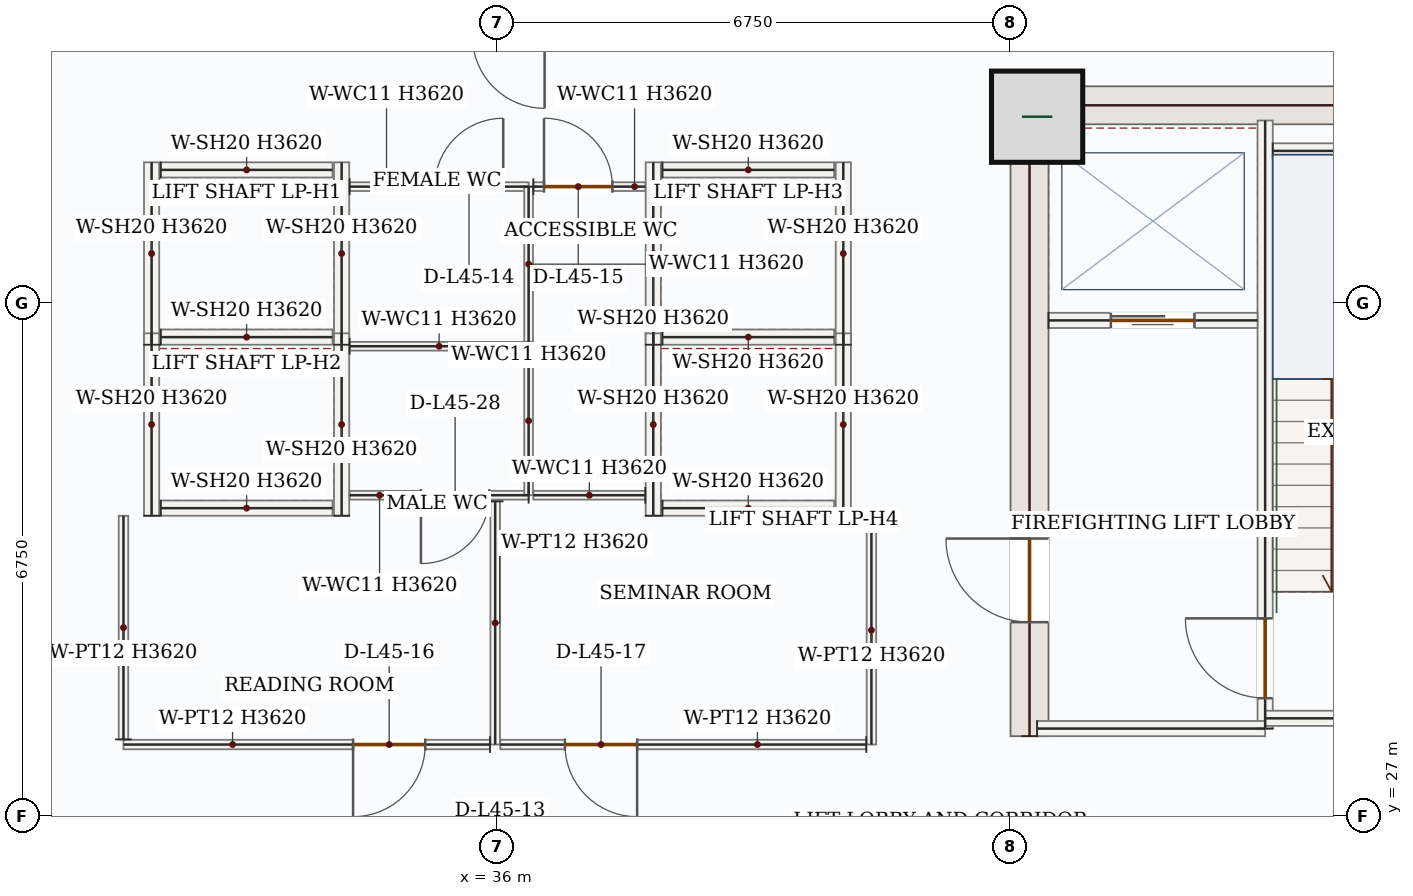
"""IFC4 building model, lengths in metres.
Left out: names, types, materials, properties, quantities, classifications, styles, units other than length and angle.
Written with IfcOpenShell. Run it as: python <this file> out.ifc"""

import sys

from ifc_helpers import new_model, si_unit, direction, frame, frame_2d, origin, origin_2d, place, context, subcontext, project, spatial, rectangle, extrude, source, transform, mapped, element, fill, save


model = new_model("IFC4")
c1 = context("Model", 3, precision=1e-05, world=origin(), true_north=direction((0.0, 1.0)))
c2 = subcontext(c1, "Body", "Model", "MODEL_VIEW")
j1 = project(units=[si_unit("LENGTHUNIT", "METRE"), si_unit("PLANEANGLEUNIT", "RADIAN")], contexts=[c1])
p1 = place(None, origin())
s1 = spatial("IfcSite", under=j1, at=p1, CompositionType="ELEMENT")
p2 = place(p1, origin())
s2 = spatial("IfcBuilding", under=s1, at=p2, CompositionType="ELEMENT")
p3 = place(p2, frame((0.0, 0.0, 194.1)))
s3 = spatial("IfcBuildingStorey", under=s2, at=p3, CompositionType="ELEMENT", Elevation=194.1)
p4 = place(p3, frame((43.0, 28.05, 0.0), z_axis=(0.0, 0.0, 1.0), x_axis=(0.0, 1.0, 0.0)))
e1 = element("IfcWall", 1, at=p4, inside=s3, PredefinedType="SHEAR", context=c2, shape_type="SweptSolid", body=[
    extrude(rectangle(XDim=8.55, YDim=0.5, at=frame_2d((4.275, 0.0))), origin(), (0.0, 0.0, 1.0), 3.62),
])
p5 = place(p4, frame((1.5, 0.0, 0.0)))
e2 = element("IfcOpeningElement", 2, at=p5, cuts=e1, PredefinedType="OPENING", context=c2, shape_type="SweptSolid", body=[
    extrude(rectangle(XDim=1.1, YDim=2.2, at=frame_2d((0.55, 1.1))), frame((0.0, 0.26, 0.0), z_axis=(0.0, -1.0, 0.0), x_axis=(1.0, 0.0, 0.0)), (0.0, 0.0, 1.0), 0.52),
])
m1 = source(origin(), c2, "Body", "SweptSolid", [
    extrude(rectangle(XDim=7.0, YDim=0.5, at=frame_2d((3.5, 0.0))), origin(), (0.0, 0.0, 1.0), 3.62),
])
p6 = place(p3, frame((43.25, 36.35, 0.0), z_axis=(0.0, 0.0, 1.0), x_axis=(1.0, 0.0, 0.0)))
e3 = element("IfcWall", 3, at=p6, inside=s3, PredefinedType="SHEAR", context=c2, shape_type="MappedRepresentation", body=[
    mapped(m1, transform((0.0, 0.0, 0.0), x_axis=(1.0, 0.0, 0.0), y_axis=(0.0, 1.0, 0.0), z_axis=(0.0, 0.0, 1.0), scale=1.0)),
])
m2 = source(origin(), c2, "Body", "SweptSolid", [
    extrude(rectangle(XDim=1.2, YDim=1.2, at=origin_2d()), origin(), (0.0, 0.0, 1.0), 3.9),
])
p7 = place(p3, frame((43.1, 36.2, 0.0), z_axis=(0.0, 0.0, 1.0), x_axis=(1.0, 0.0, 0.0)))
e4 = element("IfcColumn", 4, at=p7, inside=s3, PredefinedType="COLUMN", context=c2, shape_type="MappedRepresentation", body=[
    mapped(m2, transform((0.0, 0.0, 0.0), x_axis=(1.0, 0.0, 0.0), y_axis=(0.0, 1.0, 0.0), z_axis=(0.0, 0.0, 1.0), scale=1.0)),
])
p8 = place(p3, frame((46.1, 28.15, 0.0), z_axis=(0.0, 0.0, 1.0), x_axis=(0.0, 1.0, 0.0)))
e5 = element("IfcWall", 5, at=p8, inside=s3, PredefinedType="SOLIDWALL", context=c2, shape_type="SweptSolid", body=[
    extrude(rectangle(XDim=8.0, YDim=0.2, at=frame_2d((4.0, 0.0))), origin(), (0.0, 0.0, 1.0), 3.62),
])
p9 = place(p8, frame((0.4, 0.0, 0.0)))
e6 = element("IfcOpeningElement", 6, at=p9, cuts=e5, PredefinedType="OPENING", context=c2, shape_type="SweptSolid", body=[
    extrude(rectangle(XDim=1.05, YDim=2.15, at=frame_2d((0.525, 1.075))), frame((0.0, 0.11, 0.0), z_axis=(0.0, -1.0, 0.0), x_axis=(1.0, 0.0, 0.0)), (0.0, 0.0, 1.0), 0.22),
])
m3 = source(origin(), c2, "Body", "SweptSolid", [
    extrude(rectangle(XDim=3.0, YDim=0.2, at=frame_2d((1.5, 0.0))), origin(), (0.0, 0.0, 1.0), 3.62),
])
p10 = place(p3, frame((43.1, 28.15, 0.0), z_axis=(0.0, 0.0, 1.0), x_axis=(1.0, 0.0, 0.0)))
e7 = element("IfcWall", 7, at=p10, inside=s3, PredefinedType="SOLIDWALL", context=c2, shape_type="MappedRepresentation", body=[
    mapped(m3, transform((0.0, 0.0, 0.0), x_axis=(1.0, 0.0, 0.0), y_axis=(0.0, 1.0, 0.0), z_axis=(0.0, 0.0, 1.0), scale=1.0)),
])
m4 = source(origin(), c2, "Body", "SweptSolid", [
    extrude(rectangle(XDim=4.25, YDim=0.2, at=frame_2d((2.125, 0.0))), origin(), (0.0, 0.0, 1.0), 3.62),
])
p11 = place(p3, frame((46.1, 28.285, 0.0), z_axis=(0.0, 0.0, 1.0), x_axis=(1.0, 0.0, 0.0)))
e8 = element("IfcWall", 8, at=p11, inside=s3, PredefinedType="SOLIDWALL", context=c2, shape_type="MappedRepresentation", body=[
    mapped(m4, transform((0.0, 0.0, 0.0), x_axis=(1.0, 0.0, 0.0), y_axis=(0.0, 1.0, 0.0), z_axis=(0.0, 0.0, 1.0), scale=1.0)),
])
m5 = source(origin(), c2, "Body", "SweptSolid", [
    extrude(rectangle(XDim=3.25, YDim=0.2, at=frame_2d((1.625, 0.0))), origin(), (0.0, 0.0, 1.0), 3.62),
])
p12 = place(p3, frame((46.2, 35.75, 0.0), z_axis=(0.0, 0.0, 1.0), x_axis=(1.0, 0.0, 0.0)))
e9 = element("IfcWall", 9, at=p12, inside=s3, PredefinedType="SOLIDWALL", context=c2, shape_type="MappedRepresentation", body=[
    mapped(m5, transform((0.0, 0.0, 0.0), x_axis=(1.0, 0.0, 0.0), y_axis=(0.0, 1.0, 0.0), z_axis=(0.0, 0.0, 1.0), scale=1.0)),
])
p13 = place(p3, frame((43.25, 33.52, 0.0), z_axis=(0.0, 0.0, 1.0), x_axis=(1.0, 0.0, 0.0)))
e10 = element("IfcWall", 10, at=p13, inside=s3, PredefinedType="SOLIDWALL", context=c2, shape_type="SweptSolid", body=[
    extrude(rectangle(XDim=2.75, YDim=0.2, at=frame_2d((1.375, 0.0))), origin(), (0.0, 0.0, 1.0), 3.62),
])
p14 = place(p13, frame((0.82, 0.0, 0.0)))
e11 = element("IfcOpeningElement", 11, at=p14, cuts=e10, PredefinedType="OPENING", context=c2, shape_type="SweptSolid", body=[
    extrude(rectangle(XDim=1.1, YDim=2.15, at=frame_2d((0.55, 1.075))), frame((0.0, 0.11, 0.0), z_axis=(0.0, -1.0, 0.0), x_axis=(1.0, 0.0, 0.0)), (0.0, 0.0, 1.0), 0.22),
])
m6 = source(origin(), c2, "Body", "SweptSolid", [
    extrude(rectangle(XDim=2.4, YDim=0.2, at=frame_2d((1.2, 0.0))), origin(), (0.0, 0.0, 1.0), 3.62),
])
for number, where, z_axis, x_axis in (
    (12, (31.45, 33.2, 0.0), (0.0, 0.0, 1.0), (0.0, 1.0, 0.0)),
    (13, (33.95, 33.2, 0.0), (0.0, 0.0, 1.0), (0.0, 1.0, 0.0)),
):
    element("IfcWall", number, at=place(p3, frame(where, z_axis=z_axis, x_axis=x_axis)), inside=s3, PredefinedType="SOLIDWALL", context=c2, shape_type="MappedRepresentation", body=[
        mapped(m6, transform((0.0, 0.0, 0.0), x_axis=(1.0, 0.0, 0.0), y_axis=(0.0, 1.0, 0.0), z_axis=(0.0, 0.0, 1.0), scale=1.0)),
    ])
m7 = source(origin(), c2, "Body", "SweptSolid", [
    extrude(rectangle(XDim=2.26, YDim=0.2, at=frame_2d((1.13, 0.0))), origin(), (0.0, 0.0, 1.0), 3.62),
])
for number, where, z_axis, x_axis in (
    (14, (31.57, 33.3, 0.0), (0.0, 0.0, 1.0), (1.0, 0.0, 0.0)),
    (15, (31.57, 35.5, 0.0), (0.0, 0.0, 1.0), (1.0, 0.0, 0.0)),
):
    element("IfcWall", number, at=place(p3, frame(where, z_axis=z_axis, x_axis=x_axis)), inside=s3, PredefinedType="SOLIDWALL", context=c2, shape_type="MappedRepresentation", body=[
        mapped(m7, transform((0.0, 0.0, 0.0), x_axis=(1.0, 0.0, 0.0), y_axis=(0.0, 1.0, 0.0), z_axis=(0.0, 0.0, 1.0), scale=1.0)),
    ])
for number, where, z_axis, x_axis in (
    (16, (31.45, 30.95, 0.0), (0.0, 0.0, 1.0), (0.0, 1.0, 0.0)),
    (17, (33.95, 30.95, 0.0), (0.0, 0.0, 1.0), (0.0, 1.0, 0.0)),
):
    element("IfcWall", number, at=place(p3, frame(where, z_axis=z_axis, x_axis=x_axis)), inside=s3, PredefinedType="SOLIDWALL", context=c2, shape_type="MappedRepresentation", body=[
        mapped(m6, transform((0.0, 0.0, 0.0), x_axis=(1.0, 0.0, 0.0), y_axis=(0.0, 1.0, 0.0), z_axis=(0.0, 0.0, 1.0), scale=1.0)),
    ])
p15 = place(p3, frame((31.57, 31.05, 0.0), z_axis=(0.0, 0.0, 1.0), x_axis=(1.0, 0.0, 0.0)))
e18 = element("IfcWall", 18, at=p15, inside=s3, PredefinedType="SOLIDWALL", context=c2, shape_type="MappedRepresentation", body=[
    mapped(m7, transform((0.0, 0.0, 0.0), x_axis=(1.0, 0.0, 0.0), y_axis=(0.0, 1.0, 0.0), z_axis=(0.0, 0.0, 1.0), scale=1.0)),
])
for number, where, z_axis, x_axis in (
    (19, (38.05, 33.2, 0.0), (0.0, 0.0, 1.0), (0.0, 1.0, 0.0)),
    (20, (40.55, 33.2, 0.0), (0.0, 0.0, 1.0), (0.0, 1.0, 0.0)),
):
    element("IfcWall", number, at=place(p3, frame(where, z_axis=z_axis, x_axis=x_axis)), inside=s3, PredefinedType="SOLIDWALL", context=c2, shape_type="MappedRepresentation", body=[
        mapped(m6, transform((0.0, 0.0, 0.0), x_axis=(1.0, 0.0, 0.0), y_axis=(0.0, 1.0, 0.0), z_axis=(0.0, 0.0, 1.0), scale=1.0)),
    ])
for number, where, z_axis, x_axis in (
    (21, (38.17, 33.3, 0.0), (0.0, 0.0, 1.0), (1.0, 0.0, 0.0)),
    (22, (38.17, 35.5, 0.0), (0.0, 0.0, 1.0), (1.0, 0.0, 0.0)),
):
    element("IfcWall", number, at=place(p3, frame(where, z_axis=z_axis, x_axis=x_axis)), inside=s3, PredefinedType="SOLIDWALL", context=c2, shape_type="MappedRepresentation", body=[
        mapped(m7, transform((0.0, 0.0, 0.0), x_axis=(1.0, 0.0, 0.0), y_axis=(0.0, 1.0, 0.0), z_axis=(0.0, 0.0, 1.0), scale=1.0)),
    ])
for number, where, z_axis, x_axis in (
    (23, (38.05, 30.95, 0.0), (0.0, 0.0, 1.0), (0.0, 1.0, 0.0)),
    (24, (40.55, 30.95, 0.0), (0.0, 0.0, 1.0), (0.0, 1.0, 0.0)),
):
    element("IfcWall", number, at=place(p3, frame(where, z_axis=z_axis, x_axis=x_axis)), inside=s3, PredefinedType="SOLIDWALL", context=c2, shape_type="MappedRepresentation", body=[
        mapped(m6, transform((0.0, 0.0, 0.0), x_axis=(1.0, 0.0, 0.0), y_axis=(0.0, 1.0, 0.0), z_axis=(0.0, 0.0, 1.0), scale=1.0)),
    ])
p16 = place(p3, frame((38.17, 31.05, 0.0), z_axis=(0.0, 0.0, 1.0), x_axis=(1.0, 0.0, 0.0)))
e25 = element("IfcWall", 25, at=p16, inside=s3, PredefinedType="SOLIDWALL", context=c2, shape_type="MappedRepresentation", body=[
    mapped(m7, transform((0.0, 0.0, 0.0), x_axis=(1.0, 0.0, 0.0), y_axis=(0.0, 1.0, 0.0), z_axis=(0.0, 0.0, 1.0), scale=1.0)),
])
p17 = place(p3, frame((36.41, 31.22, 0.0), z_axis=(0.0, 0.0, 1.0), x_axis=(-1.0, 0.0, 0.0)))
e26 = element("IfcWall", 26, at=p17, inside=s3, PredefinedType="PARTITIONING", context=c2, shape_type="SweptSolid", body=[
    extrude(rectangle(XDim=2.355, YDim=0.115, at=frame_2d((1.177, 0.0))), origin(), (0.0, 0.0, 1.0), 3.62),
])
p18 = place(p17, frame((0.517, 0.0, 0.0)))
e27 = element("IfcOpeningElement", 27, at=p18, cuts=e26, PredefinedType="OPENING", context=c2, shape_type="SweptSolid", body=[
    extrude(rectangle(XDim=0.9, YDim=2.1, at=frame_2d((0.45, 1.05))), frame((0.0, 0.067, 0.0), z_axis=(0.0, -1.0, 0.0), x_axis=(1.0, 0.0, 0.0)), (0.0, 0.0, 1.0), 0.135),
])
m8 = source(origin(), c2, "Body", "SweptSolid", [
    extrude(rectangle(XDim=2.355, YDim=0.115, at=frame_2d((1.177, 0.0))), origin(), (0.0, 0.0, 1.0), 3.62),
])
p19 = place(p3, frame((34.055, 33.18, 0.0), z_axis=(0.0, 0.0, 1.0), x_axis=(1.0, 0.0, 0.0)))
e28 = element("IfcWall", 28, at=p19, inside=s3, PredefinedType="PARTITIONING", context=c2, shape_type="MappedRepresentation", body=[
    mapped(m8, transform((0.0, 0.0, 0.0), x_axis=(1.0, 0.0, 0.0), y_axis=(0.0, 1.0, 0.0), z_axis=(0.0, 0.0, 1.0), scale=1.0)),
])
m9 = source(origin(), c2, "Body", "SweptSolid", [
    extrude(rectangle(XDim=1.96, YDim=0.115, at=frame_2d((0.98, 0.0))), origin(), (0.0, 0.0, 1.0), 3.62),
])
p20 = place(p3, frame((36.41, 33.18, 0.0), z_axis=(0.0, 0.0, 1.0), x_axis=(0.0, -1.0, 0.0)))
e29 = element("IfcWall", 29, at=p20, inside=s3, PredefinedType="PARTITIONING", context=c2, shape_type="MappedRepresentation", body=[
    mapped(m9, transform((0.0, 0.0, 0.0), x_axis=(1.0, 0.0, 0.0), y_axis=(0.0, 1.0, 0.0), z_axis=(0.0, 0.0, 1.0), scale=1.0)),
])
p21 = place(p3, frame((34.055, 35.28, 0.0), z_axis=(0.0, 0.0, 1.0), x_axis=(1.0, 0.0, 0.0)))
e30 = element("IfcWall", 30, at=p21, inside=s3, PredefinedType="PARTITIONING", context=c2, shape_type="SweptSolid", body=[
    extrude(rectangle(XDim=2.355, YDim=0.115, at=frame_2d((1.177, 0.0))), origin(), (0.0, 0.0, 1.0), 3.62),
])
p22 = place(p21, frame((1.121, 0.0, 0.0)))
e31 = element("IfcOpeningElement", 31, at=p22, cuts=e30, PredefinedType="OPENING", context=c2, shape_type="SweptSolid", body=[
    extrude(rectangle(XDim=0.9, YDim=2.1, at=frame_2d((0.45, 1.05))), frame((0.0, 0.067, 0.0), z_axis=(0.0, -1.0, 0.0), x_axis=(1.0, 0.0, 0.0)), (0.0, 0.0, 1.0), 0.135),
])
m10 = source(origin(), c2, "Body", "SweptSolid", [
    extrude(rectangle(XDim=2.04, YDim=0.115, at=frame_2d((1.02, 0.0))), origin(), (0.0, 0.0, 1.0), 3.62),
])
p23 = place(p3, frame((36.41, 35.28, 0.0), z_axis=(0.0, 0.0, 1.0), x_axis=(0.0, -1.0, 0.0)))
e32 = element("IfcWall", 32, at=p23, inside=s3, PredefinedType="PARTITIONING", context=c2, shape_type="MappedRepresentation", body=[
    mapped(m10, transform((0.0, 0.0, 0.0), x_axis=(1.0, 0.0, 0.0), y_axis=(0.0, 1.0, 0.0), z_axis=(0.0, 0.0, 1.0), scale=1.0)),
])
m11 = source(origin(), c2, "Body", "SweptSolid", [
    extrude(rectangle(XDim=1.473, YDim=0.115, at=frame_2d((0.736, 0.0))), origin(), (0.0, 0.0, 1.0), 3.62),
])
p24 = place(p3, frame((37.945, 31.22, 0.0), z_axis=(0.0, 0.0, 1.0), x_axis=(-1.0, 0.0, 0.0)))
e33 = element("IfcWall", 33, at=p24, inside=s3, PredefinedType="PARTITIONING", context=c2, shape_type="MappedRepresentation", body=[
    mapped(m11, transform((0.0, 0.0, 0.0), x_axis=(1.0, 0.0, 0.0), y_axis=(0.0, 1.0, 0.0), z_axis=(0.0, 0.0, 1.0), scale=1.0)),
])
p25 = place(p3, frame((36.472, 35.28, 0.0), z_axis=(0.0, 0.0, 1.0), x_axis=(1.0, 0.0, 0.0)))
e34 = element("IfcWall", 34, at=p25, inside=s3, PredefinedType="PARTITIONING", context=c2, shape_type="SweptSolid", body=[
    extrude(rectangle(XDim=1.473, YDim=0.115, at=frame_2d((0.736, 0.0))), origin(), (0.0, 0.0, 1.0), 3.62),
])
p26 = place(p25, frame((0.14, 0.0, 0.0)))
e35 = element("IfcOpeningElement", 35, at=p26, cuts=e34, PredefinedType="OPENING", context=c2, shape_type="SweptSolid", body=[
    extrude(rectangle(XDim=0.9, YDim=2.1, at=frame_2d((0.45, 1.05))), frame((0.0, 0.067, 0.0), z_axis=(0.0, -1.0, 0.0), x_axis=(1.0, 0.0, 0.0)), (0.0, 0.0, 1.0), 0.135),
])
m12 = source(origin(), c2, "Body", "SweptSolid", [
    extrude(rectangle(XDim=3.2, YDim=0.125, at=frame_2d((1.6, 0.0))), origin(), (0.0, 0.0, 1.0), 3.62),
])
p27 = place(p3, frame((35.97, 31.14, 0.0), z_axis=(0.0, 0.0, 1.0), x_axis=(0.0, -1.0, 0.0)))
e36 = element("IfcWall", 36, at=p27, inside=s3, PredefinedType="PARTITIONING", context=c2, shape_type="MappedRepresentation", body=[
    mapped(m12, transform((0.0, 0.0, 0.0), x_axis=(1.0, 0.0, 0.0), y_axis=(0.0, 1.0, 0.0), z_axis=(0.0, 0.0, 1.0), scale=1.0)),
])
p28 = place(p3, frame((35.903, 27.94, 0.0), z_axis=(0.0, 0.0, 1.0), x_axis=(-1.0, 0.0, 0.0)))
e37 = element("IfcWall", 37, at=p28, inside=s3, PredefinedType="PARTITIONING", context=c2, shape_type="SweptSolid", body=[
    extrude(rectangle(XDim=4.823, YDim=0.125, at=frame_2d((2.411, 0.0))), origin(), (0.0, 0.0, 1.0), 3.62),
])
p29 = place(p28, frame((0.852, 0.0, 0.0)))
e38 = element("IfcOpeningElement", 38, at=p29, cuts=e37, PredefinedType="OPENING", context=c2, shape_type="SweptSolid", body=[
    extrude(rectangle(XDim=0.95, YDim=2.15, at=frame_2d((0.475, 1.075))), frame((0.0, 0.073, 0.0), z_axis=(0.0, -1.0, 0.0), x_axis=(1.0, 0.0, 0.0)), (0.0, 0.0, 1.0), 0.145),
])
m13 = source(origin(), c2, "Body", "SweptSolid", [
    extrude(rectangle(XDim=2.942, YDim=0.125, at=frame_2d((1.471, 0.0))), origin(), (0.0, 0.0, 1.0), 3.62),
])
p30 = place(p3, frame((31.08, 28.008, 0.0), z_axis=(0.0, 0.0, 1.0), x_axis=(0.0, 1.0, 0.0)))
e39 = element("IfcWall", 39, at=p30, inside=s3, PredefinedType="PARTITIONING", context=c2, shape_type="MappedRepresentation", body=[
    mapped(m13, transform((0.0, 0.0, 0.0), x_axis=(1.0, 0.0, 0.0), y_axis=(0.0, 1.0, 0.0), z_axis=(0.0, 0.0, 1.0), scale=1.0)),
])
m14 = source(origin(), c2, "Body", "SweptSolid", [
    extrude(rectangle(XDim=3.01, YDim=0.125, at=frame_2d((1.505, 0.0))), origin(), (0.0, 0.0, 1.0), 3.62),
])
p31 = place(p3, frame((40.92, 30.95, 0.0), z_axis=(0.0, 0.0, 1.0), x_axis=(0.0, -1.0, 0.0)))
e40 = element("IfcWall", 40, at=p31, inside=s3, PredefinedType="PARTITIONING", context=c2, shape_type="MappedRepresentation", body=[
    mapped(m14, transform((0.0, 0.0, 0.0), x_axis=(1.0, 0.0, 0.0), y_axis=(0.0, 1.0, 0.0), z_axis=(0.0, 0.0, 1.0), scale=1.0)),
])
p32 = place(p3, frame((40.853, 27.94, 0.0), z_axis=(0.0, 0.0, 1.0), x_axis=(-1.0, 0.0, 0.0)))
e41 = element("IfcWall", 41, at=p32, inside=s3, PredefinedType="PARTITIONING", context=c2, shape_type="SweptSolid", body=[
    extrude(rectangle(XDim=4.815, YDim=0.125, at=frame_2d((2.407, 0.0))), origin(), (0.0, 0.0, 1.0), 3.62),
])
p33 = place(p32, frame((3.015, 0.0, 0.0)))
e42 = element("IfcOpeningElement", 42, at=p33, cuts=e41, PredefinedType="OPENING", context=c2, shape_type="SweptSolid", body=[
    extrude(rectangle(XDim=0.95, YDim=2.15, at=frame_2d((0.475, 1.075))), frame((0.0, 0.073, 0.0), z_axis=(0.0, -1.0, 0.0), x_axis=(1.0, 0.0, 0.0)), (0.0, 0.0, 1.0), 0.145),
])
m15 = source(origin(), c2, "Body", "SweptSolid", [
    extrude(rectangle(XDim=1.05, YDim=2.15, at=frame_2d((0.525, 1.075))), frame((0.0, 0.025, 0.0), z_axis=(0.0, -1.0, 0.0), x_axis=(1.0, 0.0, 0.0)), (0.0, 0.0, 1.0), 0.05),
])
p34 = place(p9, origin())
e43 = element("IfcDoor", 43, at=p34, inside=s3, OperationType="SINGLE_SWING_RIGHT", PredefinedType="DOOR", context=c2, shape_type="MappedRepresentation", body=[
    mapped(m15, transform((0.0, 0.0, 0.0), x_axis=(1.0, 0.0, 0.0), y_axis=(0.0, 1.0, 0.0), z_axis=(0.0, 0.0, 1.0), scale=1.0)),
])
fill(e6, e43)
m16 = source(origin(), c2, "Body", "SweptSolid", [
    extrude(rectangle(XDim=1.1, YDim=2.15, at=frame_2d((0.55, 1.075))), frame((0.0, 0.025, 0.0), z_axis=(0.0, -1.0, 0.0), x_axis=(1.0, 0.0, 0.0)), (0.0, 0.0, 1.0), 0.05),
])
p35 = place(p14, origin())
e44 = element("IfcDoor", 44, at=p35, inside=s3, OperationType="DOUBLE_DOOR_SLIDING", PredefinedType="DOOR", context=c2, shape_type="MappedRepresentation", body=[
    mapped(m16, transform((0.0, 0.0, 0.0), x_axis=(1.0, 0.0, 0.0), y_axis=(0.0, 1.0, 0.0), z_axis=(0.0, 0.0, 1.0), scale=1.0)),
])
fill(e11, e44)
m17 = source(origin(), c2, "Body", "SweptSolid", [
    extrude(rectangle(XDim=1.1, YDim=2.2, at=frame_2d((0.55, 1.1))), frame((0.0, 0.025, 0.0), z_axis=(0.0, -1.0, 0.0), x_axis=(1.0, 0.0, 0.0)), (0.0, 0.0, 1.0), 0.05),
])
p36 = place(p5, origin())
e45 = element("IfcDoor", 45, at=p36, inside=s3, OperationType="SINGLE_SWING_RIGHT", PredefinedType="DOOR", context=c2, shape_type="MappedRepresentation", body=[
    mapped(m17, transform((0.0, 0.0, 0.0), x_axis=(1.0, 0.0, 0.0), y_axis=(0.0, 1.0, 0.0), z_axis=(0.0, 0.0, 1.0), scale=1.0)),
])
fill(e2, e45)
m18 = source(origin(), c2, "Body", "SweptSolid", [
    extrude(rectangle(XDim=0.9, YDim=2.1, at=frame_2d((0.45, 1.05))), frame((0.0, 0.025, 0.0), z_axis=(0.0, -1.0, 0.0), x_axis=(1.0, 0.0, 0.0)), (0.0, 0.0, 1.0), 0.05),
])
p37 = place(p22, origin())
e46 = element("IfcDoor", 46, at=p37, inside=s3, OperationType="SINGLE_SWING_RIGHT", PredefinedType="DOOR", context=c2, shape_type="MappedRepresentation", body=[
    mapped(m18, transform((0.0, 0.0, 0.0), x_axis=(1.0, 0.0, 0.0), y_axis=(0.0, 1.0, 0.0), z_axis=(0.0, 0.0, 1.0), scale=1.0)),
])
fill(e31, e46)
p38 = place(p26, origin())
e47 = element("IfcDoor", 47, at=p38, inside=s3, OperationType="SINGLE_SWING_LEFT", PredefinedType="DOOR", context=c2, shape_type="MappedRepresentation", body=[
    mapped(m18, transform((0.0, 0.0, 0.0), x_axis=(1.0, 0.0, 0.0), y_axis=(0.0, 1.0, 0.0), z_axis=(0.0, 0.0, 1.0), scale=1.0)),
])
fill(e35, e47)
m19 = source(origin(), c2, "Body", "SweptSolid", [
    extrude(rectangle(XDim=0.95, YDim=2.15, at=frame_2d((0.475, 1.075))), frame((0.0, 0.025, 0.0), z_axis=(0.0, -1.0, 0.0), x_axis=(1.0, 0.0, 0.0)), (0.0, 0.0, 1.0), 0.05),
])
p39 = place(p29, origin())
e48 = element("IfcDoor", 48, at=p39, inside=s3, OperationType="SINGLE_SWING_RIGHT", PredefinedType="DOOR", context=c2, shape_type="MappedRepresentation", body=[
    mapped(m19, transform((0.0, 0.0, 0.0), x_axis=(1.0, 0.0, 0.0), y_axis=(0.0, 1.0, 0.0), z_axis=(0.0, 0.0, 1.0), scale=1.0)),
])
fill(e38, e48)
p40 = place(p33, origin())
e49 = element("IfcDoor", 49, at=p40, inside=s3, OperationType="SINGLE_SWING_LEFT", PredefinedType="DOOR", context=c2, shape_type="MappedRepresentation", body=[
    mapped(m19, transform((0.0, 0.0, 0.0), x_axis=(1.0, 0.0, 0.0), y_axis=(0.0, 1.0, 0.0), z_axis=(0.0, 0.0, 1.0), scale=1.0)),
])
fill(e42, e49)
p41 = place(p18, origin())
e50 = element("IfcDoor", 50, at=p41, inside=s3, OperationType="SINGLE_SWING_RIGHT", PredefinedType="DOOR", context=c2, shape_type="MappedRepresentation", body=[
    mapped(m18, transform((0.0, 0.0, 0.0), x_axis=(1.0, 0.0, 0.0), y_axis=(0.0, 1.0, 0.0), z_axis=(0.0, 0.0, 1.0), scale=1.0)),
])
fill(e27, e50)
save(model, sys.argv[1])
